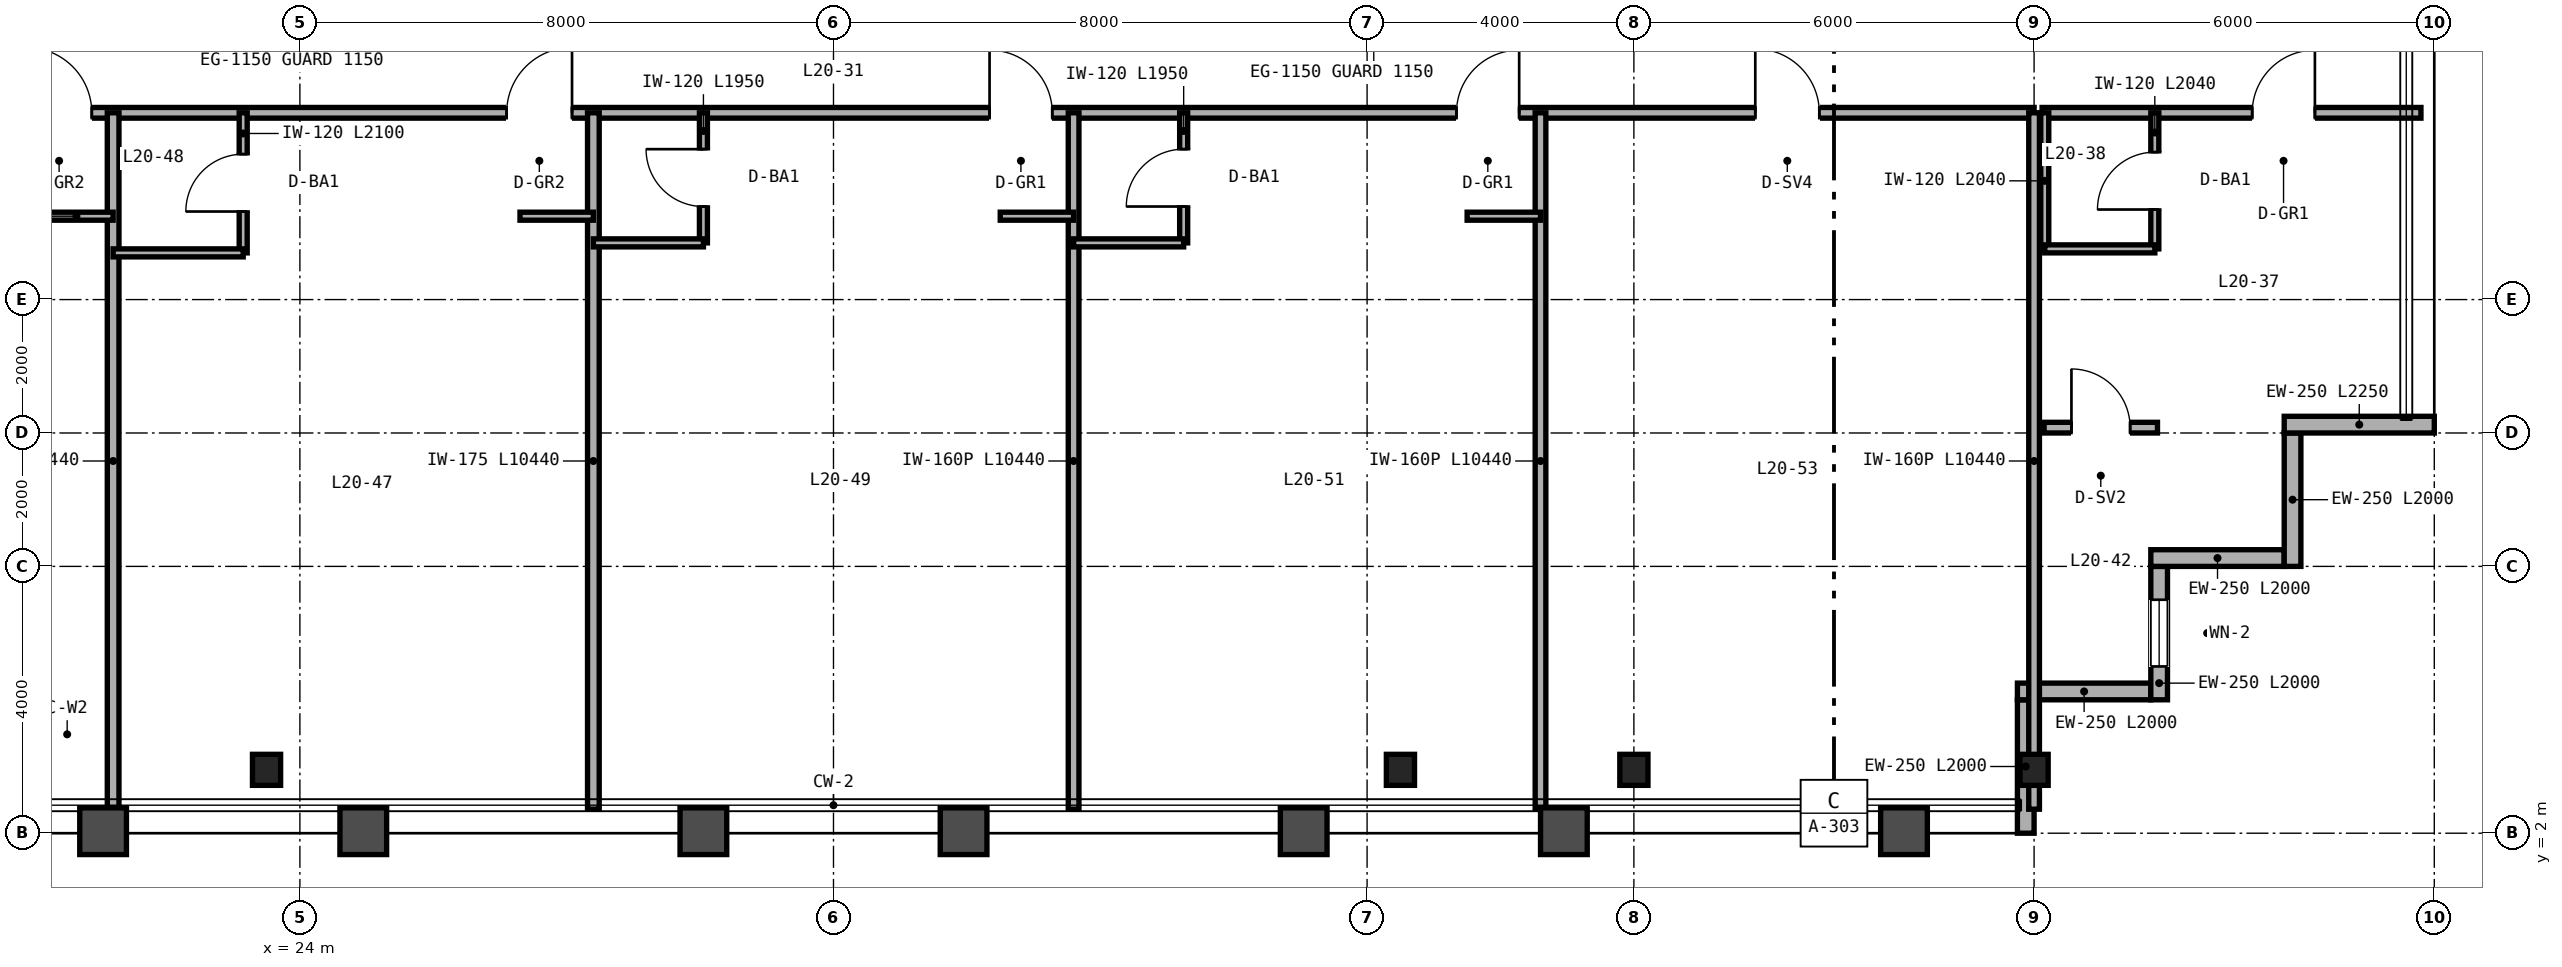
"""IFC4 building model, lengths in metres.
Left out: names, types, materials, properties, quantities, classifications, styles, units other than length and angle.
Written with IfcOpenShell. Run it as: python <this file> out.ifc"""

import sys

from ifc_helpers import new_model, si_unit, direction, frame, frame_2d, origin, origin_2d, place, context, subcontext, project, spatial, rectangle, i_section, extrude, source, transform, mapped, element, fill, save


model = new_model("IFC4")
c1 = context("Model", 3, precision=1e-05, world=origin(), true_north=direction((0.0, 1.0)))
c2 = subcontext(c1, "Body", "Model", "MODEL_VIEW")
j1 = project(units=[si_unit("LENGTHUNIT", "METRE"), si_unit("PLANEANGLEUNIT", "RADIAN")], contexts=[c1])
p1 = place(None, origin())
s1 = spatial("IfcSite", under=j1, at=p1, CompositionType="ELEMENT")
p2 = place(p1, origin())
s2 = spatial("IfcBuilding", under=s1, at=p2, CompositionType="ELEMENT")
p3 = place(p2, frame((0.0, 0.0, 81.6)))
s3 = spatial("IfcBuildingStorey", under=s2, at=p3, CompositionType="ELEMENT", Elevation=81.6)
m1 = source(origin(), c2, "Body", "SweptSolid", [
    extrude(i_section(OverallWidth=0.422, OverallDepth=0.465, WebThickness=0.045, FlangeThickness=0.073, FilletRadius=0.025, at=origin_2d()), origin(), (0.0, 0.0, 1.0), 3.28),
])
for number, where, z_axis, x_axis in (
    (1, (23.5, 2.95, 0.0), (0.0, 0.0, 1.0), (1.0, 0.0, 0.0)),
    (2, (40.5, 2.95, 0.0), (0.0, 0.0, 1.0), (1.0, 0.0, 0.0)),
    (3, (44.0, 2.95, 0.0), (0.0, 0.0, 1.0), (1.0, 0.0, 0.0)),
    (4, (50.0, 2.95, 0.0), (0.0, 0.0, 1.0), (1.0, 0.0, 0.0)),
):
    element("IfcColumn", number, at=place(p3, frame(where, z_axis=z_axis, x_axis=x_axis)), inside=s3, PredefinedType="COLUMN", context=c2, shape_type="MappedRepresentation", body=[
        mapped(m1, transform((0.0, 0.0, 0.0), scale=1.0)),
    ])
p4 = place(p3, frame((49.875, 2.0, 0.0), z_axis=(0.0, 0.0, 1.0), x_axis=(0.0, 1.0, 0.0)))
e5 = element("IfcWall", 5, at=p4, inside=s3, PredefinedType="SOLIDWALL", context=c2, shape_type="SweptSolid", body=[
    extrude(rectangle(XDim=2.0, YDim=0.25, at=frame_2d((1.0, 0.0))), origin(), (0.0, 0.0, 1.0), 2.587),
])
p5 = place(p3, frame((49.75, 4.125, 0.0), z_axis=(0.0, 0.0, 1.0), x_axis=(1.0, 0.0, 0.0)))
e6 = element("IfcWall", 6, at=p5, inside=s3, PredefinedType="SOLIDWALL", context=c2, shape_type="SweptSolid", body=[
    extrude(rectangle(XDim=2.0, YDim=0.25, at=frame_2d((1.0, 0.0))), origin(), (0.0, 0.0, 1.0), 3.28),
])
p6 = place(p3, frame((51.875, 4.0, 0.0), z_axis=(0.0, 0.0, 1.0), x_axis=(0.0, 1.0, 0.0)))
e7 = element("IfcWall", 7, at=p6, inside=s3, PredefinedType="SOLIDWALL", context=c2, shape_type="SweptSolid", body=[
    extrude(rectangle(XDim=2.0, YDim=0.25, at=frame_2d((1.0, 0.0))), origin(), (0.0, 0.0, 1.0), 3.28),
])
p7 = place(p6, frame((0.5, 0.0, 0.85)))
e8 = element("IfcOpeningElement", 8, at=p7, cuts=e7, PredefinedType="OPENING", context=c2, shape_type="SweptSolid", body=[
    extrude(rectangle(XDim=1.0, YDim=1.9, at=frame_2d((0.5, 0.95))), frame((0.0, 0.135, 0.0), z_axis=(0.0, -1.0, 0.0), x_axis=(1.0, 0.0, 0.0)), (0.0, 0.0, 1.0), 0.27),
])
for number, where, z_axis, x_axis in (
    (9, (51.75, 6.125, 0.0), (0.0, 0.0, 1.0), (1.0, 0.0, 0.0)),
    (10, (53.875, 6.0, 0.0), (0.0, 0.0, 1.0), (0.0, 1.0, 0.0)),
):
    element("IfcWall", number, at=place(p3, frame(where, z_axis=z_axis, x_axis=x_axis)), inside=s3, PredefinedType="SOLIDWALL", context=c2, shape_type="SweptSolid", body=[
        extrude(rectangle(XDim=2.0, YDim=0.25, at=frame_2d((1.0, 0.0))), origin(), (0.0, 0.0, 1.0), 3.28),
    ])
p8 = place(p3, frame((53.75, 8.125, 0.0), z_axis=(0.0, 0.0, 1.0), x_axis=(1.0, 0.0, 0.0)))
e11 = element("IfcWall", 11, at=p8, inside=s3, PredefinedType="SOLIDWALL", context=c2, shape_type="SweptSolid", body=[
    extrude(rectangle(XDim=2.25, YDim=0.25, at=frame_2d((1.125, 0.0))), origin(), (0.0, 0.0, 1.0), 3.28),
])
p9 = place(p3, frame((50.12, 12.8, 0.0), z_axis=(0.0, 0.0, 1.0), x_axis=(1.0, 0.0, 0.0)))
e12 = element("IfcWall", 12, at=p9, inside=s3, PredefinedType="PARTITIONING", context=c2, shape_type="SweptSolid", body=[
    extrude(rectangle(XDim=5.68, YDim=0.16, at=frame_2d((2.84, 0.0))), origin(), (0.0, 0.0, 1.0), 3.28),
])
p10 = place(p9, frame((3.15, 0.0, 0.0)))
e13 = element("IfcOpeningElement", 13, at=p10, cuts=e12, PredefinedType="OPENING", context=c2, shape_type="SweptSolid", body=[
    extrude(rectangle(XDim=0.94, YDim=2.15, at=frame_2d((0.47, 1.075))), frame((0.0, 0.09, 0.0), z_axis=(0.0, -1.0, 0.0), x_axis=(1.0, 0.0, 0.0)), (0.0, 0.0, 1.0), 0.18),
])
p11 = place(p3, frame((51.81, 10.76, 0.0), z_axis=(0.0, 0.0, 1.0), x_axis=(0.0, 1.0, 0.0)))
e14 = element("IfcWall", 14, at=p11, inside=s3, PredefinedType="PARTITIONING", context=c2, shape_type="SweptSolid", body=[
    extrude(rectangle(XDim=2.04, YDim=0.12, at=frame_2d((1.02, 0.0))), origin(), (0.0, 0.0, 1.0), 3.28),
])
p12 = place(p11, frame((0.59, 0.0, 0.0)))
e15 = element("IfcOpeningElement", 15, at=p12, cuts=e14, PredefinedType="OPENING", context=c2, shape_type="SweptSolid", body=[
    extrude(rectangle(XDim=0.86, YDim=2.1, at=frame_2d((0.43, 1.05))), frame((0.0, 0.07, 0.0), z_axis=(0.0, -1.0, 0.0), x_axis=(1.0, 0.0, 0.0)), (0.0, 0.0, 1.0), 0.14),
])
p13 = place(p3, frame((50.16, 10.76, 0.0), z_axis=(0.0, 0.0, 1.0), x_axis=(0.0, 1.0, 0.0)))
e16 = element("IfcWall", 16, at=p13, inside=s3, PredefinedType="PARTITIONING", context=c2, shape_type="SweptSolid", body=[
    extrude(rectangle(XDim=2.04, YDim=0.12, at=frame_2d((1.02, 0.0))), origin(), (0.0, 0.0, 1.0), 3.28),
])
p14 = place(p3, frame((50.16, 10.76, 0.0), z_axis=(0.0, 0.0, 1.0), x_axis=(1.0, 0.0, 0.0)))
e17 = element("IfcWall", 17, at=p14, inside=s3, PredefinedType="PARTITIONING", context=c2, shape_type="SweptSolid", body=[
    extrude(rectangle(XDim=1.65, YDim=0.12, at=frame_2d((0.825, 0.0))), origin(), (0.0, 0.0, 1.0), 3.28),
])
p15 = place(p3, frame((50.15, 8.08, 0.0), z_axis=(0.0, 0.0, 1.0), x_axis=(1.0, 0.0, 0.0)))
e18 = element("IfcWall", 18, at=p15, inside=s3, PredefinedType="PARTITIONING", context=c2, shape_type="SweptSolid", body=[
    extrude(rectangle(XDim=1.7, YDim=0.16, at=frame_2d((0.85, 0.0))), origin(), (0.0, 0.0, 1.0), 3.28),
])
p16 = place(p15, frame((0.41, 0.0, 0.0)))
e19 = element("IfcOpeningElement", 19, at=p16, cuts=e18, PredefinedType="OPENING", context=c2, shape_type="SweptSolid", body=[
    extrude(rectangle(XDim=0.88, YDim=2.15, at=frame_2d((0.44, 1.075))), frame((0.0, 0.09, 0.0), z_axis=(0.0, -1.0, 0.0), x_axis=(1.0, 0.0, 0.0)), (0.0, 0.0, 1.0), 0.18),
])
p17 = place(p3, frame((14.0, 12.8, 0.0), z_axis=(0.0, 0.0, 1.0), x_axis=(1.0, 0.0, 0.0)))
e20 = element("IfcWall", 20, at=p17, inside=s3, PredefinedType="PARTITIONING", context=c2, shape_type="SweptSolid", body=[
    extrude(rectangle(XDim=36.0, YDim=0.16, at=frame_2d((18.0, 0.0))), origin(), (0.0, 0.0, 1.0), 2.501),
])
p18 = place(p17, frame((5.9, 0.0, 0.0)))
e21 = element("IfcOpeningElement", 21, at=p18, cuts=e20, PredefinedType="OPENING", context=c2, shape_type="SweptSolid", body=[
    extrude(rectangle(XDim=0.98, YDim=2.2, at=frame_2d((0.49, 1.1))), frame((0.0, 0.09, 0.0), z_axis=(0.0, -1.0, 0.0), x_axis=(1.0, 0.0, 0.0)), (0.0, 0.0, 1.0), 0.18),
])
p19 = place(p17, frame((13.1, 0.0, 0.0)))
e22 = element("IfcOpeningElement", 22, at=p19, cuts=e20, PredefinedType="OPENING", context=c2, shape_type="SweptSolid", body=[
    extrude(rectangle(XDim=0.98, YDim=2.2, at=frame_2d((0.49, 1.1))), frame((0.0, 0.09, 0.0), z_axis=(0.0, -1.0, 0.0), x_axis=(1.0, 0.0, 0.0)), (0.0, 0.0, 1.0), 0.18),
])
p20 = place(p17, frame((20.34, 0.0, 0.0)))
e23 = element("IfcOpeningElement", 23, at=p20, cuts=e20, PredefinedType="OPENING", context=c2, shape_type="SweptSolid", body=[
    extrude(rectangle(XDim=0.94, YDim=2.15, at=frame_2d((0.47, 1.075))), frame((0.0, 0.09, 0.0), z_axis=(0.0, -1.0, 0.0), x_axis=(1.0, 0.0, 0.0)), (0.0, 0.0, 1.0), 0.18),
])
p21 = place(p17, frame((27.34, 0.0, 0.0)))
e24 = element("IfcOpeningElement", 24, at=p21, cuts=e20, PredefinedType="OPENING", context=c2, shape_type="SweptSolid", body=[
    extrude(rectangle(XDim=0.94, YDim=2.15, at=frame_2d((0.47, 1.075))), frame((0.0, 0.09, 0.0), z_axis=(0.0, -1.0, 0.0), x_axis=(1.0, 0.0, 0.0)), (0.0, 0.0, 1.0), 0.18),
])
p22 = place(p17, frame((31.82, 0.0, 0.0)))
e25 = element("IfcOpeningElement", 25, at=p22, cuts=e20, PredefinedType="OPENING", context=c2, shape_type="SweptSolid", body=[
    extrude(rectangle(XDim=0.96, YDim=2.15, at=frame_2d((0.48, 1.075))), frame((0.0, 0.09, 0.0), z_axis=(0.0, -1.0, 0.0), x_axis=(1.0, 0.0, 0.0)), (0.0, 0.0, 1.0), 0.18),
])
p23 = place(p3, frame((50.0, 2.36, 0.0), z_axis=(0.0, 0.0, 1.0), x_axis=(0.0, 1.0, 0.0)))
e26 = element("IfcWall", 26, at=p23, inside=s3, PredefinedType="PARTITIONING", context=c2, shape_type="SweptSolid", body=[
    extrude(rectangle(XDim=10.44, YDim=0.16, at=frame_2d((5.22, 0.0))), origin(), (0.0, 0.0, 1.0), 2.587),
])
p24 = place(p3, frame((21.2, 2.36, 0.0), z_axis=(0.0, 0.0, 1.0), x_axis=(0.0, 1.0, 0.0)))
e27 = element("IfcWall", 27, at=p24, inside=s3, PredefinedType="PARTITIONING", context=c2, shape_type="SweptSolid", body=[
    extrude(rectangle(XDim=10.44, YDim=0.175, at=frame_2d((5.22, 0.0))), origin(), (0.0, 0.0, 1.0), 2.743),
])
p25 = place(p3, frame((20.1, 11.25, 0.0), z_axis=(0.0, 0.0, 1.0), x_axis=(1.0, 0.0, 0.0)))
e28 = element("IfcWall", 28, at=p25, inside=s3, PredefinedType="PARTITIONING", context=c2, shape_type="SweptSolid", body=[
    extrude(rectangle(XDim=1.1, YDim=0.12, at=frame_2d((0.55, 0.0))), origin(), (0.0, 0.0, 1.0), 3.28),
])
p26 = place(p3, frame((28.4, 2.36, 0.0), z_axis=(0.0, 0.0, 1.0), x_axis=(0.0, 1.0, 0.0)))
e29 = element("IfcWall", 29, at=p26, inside=s3, PredefinedType="PARTITIONING", context=c2, shape_type="SweptSolid", body=[
    extrude(rectangle(XDim=10.44, YDim=0.175, at=frame_2d((5.22, 0.0))), origin(), (0.0, 0.0, 1.0), 2.36),
])
p27 = place(p3, frame((23.15, 10.7, 0.0), z_axis=(0.0, 0.0, 1.0), x_axis=(0.0, 1.0, 0.0)))
e30 = element("IfcWall", 30, at=p27, inside=s3, PredefinedType="PARTITIONING", context=c2, shape_type="SweptSolid", body=[
    extrude(rectangle(XDim=2.1, YDim=0.12, at=frame_2d((1.05, 0.0))), origin(), (0.0, 0.0, 1.0), 3.28),
])
p28 = place(p27, frame((0.62, 0.0, 0.0)))
e31 = element("IfcOpeningElement", 31, at=p28, cuts=e30, PredefinedType="OPENING", context=c2, shape_type="SweptSolid", body=[
    extrude(rectangle(XDim=0.86, YDim=2.1, at=frame_2d((0.43, 1.05))), frame((0.0, 0.07, 0.0), z_axis=(0.0, -1.0, 0.0), x_axis=(1.0, 0.0, 0.0)), (0.0, 0.0, 1.0), 0.14),
])
p29 = place(p3, frame((21.2, 10.7, 0.0), z_axis=(0.0, 0.0, 1.0), x_axis=(1.0, 0.0, 0.0)))
e32 = element("IfcWall", 32, at=p29, inside=s3, PredefinedType="PARTITIONING", context=c2, shape_type="SweptSolid", body=[
    extrude(rectangle(XDim=1.95, YDim=0.12, at=frame_2d((0.975, 0.0))), origin(), (0.0, 0.0, 1.0), 3.28),
])
p30 = place(p3, frame((27.3, 11.25, 0.0), z_axis=(0.0, 0.0, 1.0), x_axis=(1.0, 0.0, 0.0)))
e33 = element("IfcWall", 33, at=p30, inside=s3, PredefinedType="PARTITIONING", context=c2, shape_type="SweptSolid", body=[
    extrude(rectangle(XDim=1.1, YDim=0.12, at=frame_2d((0.55, 0.0))), origin(), (0.0, 0.0, 1.0), 3.28),
])
p31 = place(p3, frame((35.6, 2.36, 0.0), z_axis=(0.0, 0.0, 1.0), x_axis=(0.0, 1.0, 0.0)))
e34 = element("IfcWall", 34, at=p31, inside=s3, PredefinedType="PARTITIONING", context=c2, shape_type="SweptSolid", body=[
    extrude(rectangle(XDim=10.44, YDim=0.16, at=frame_2d((5.22, 0.0))), origin(), (0.0, 0.0, 1.0), 2.36),
])
p32 = place(p3, frame((30.05, 10.85, 0.0), z_axis=(0.0, 0.0, 1.0), x_axis=(0.0, 1.0, 0.0)))
e35 = element("IfcWall", 35, at=p32, inside=s3, PredefinedType="PARTITIONING", context=c2, shape_type="SweptSolid", body=[
    extrude(rectangle(XDim=1.95, YDim=0.12, at=frame_2d((0.975, 0.0))), origin(), (0.0, 0.0, 1.0), 3.28),
])
p33 = place(p32, frame((0.545, 0.0, 0.0)))
e36 = element("IfcOpeningElement", 36, at=p33, cuts=e35, PredefinedType="OPENING", context=c2, shape_type="SweptSolid", body=[
    extrude(rectangle(XDim=0.86, YDim=2.1, at=frame_2d((0.43, 1.05))), frame((0.0, 0.07, 0.0), z_axis=(0.0, -1.0, 0.0), x_axis=(1.0, 0.0, 0.0)), (0.0, 0.0, 1.0), 0.14),
])
p34 = place(p3, frame((28.4, 10.85, 0.0), z_axis=(0.0, 0.0, 1.0), x_axis=(1.0, 0.0, 0.0)))
e37 = element("IfcWall", 37, at=p34, inside=s3, PredefinedType="PARTITIONING", context=c2, shape_type="SweptSolid", body=[
    extrude(rectangle(XDim=1.65, YDim=0.12, at=frame_2d((0.825, 0.0))), origin(), (0.0, 0.0, 1.0), 3.28),
])
p35 = place(p3, frame((34.5, 11.25, 0.0), z_axis=(0.0, 0.0, 1.0), x_axis=(1.0, 0.0, 0.0)))
e38 = element("IfcWall", 38, at=p35, inside=s3, PredefinedType="PARTITIONING", context=c2, shape_type="SweptSolid", body=[
    extrude(rectangle(XDim=1.1, YDim=0.12, at=frame_2d((0.55, 0.0))), origin(), (0.0, 0.0, 1.0), 3.28),
])
p36 = place(p3, frame((42.6, 2.36, 0.0), z_axis=(0.0, 0.0, 1.0), x_axis=(0.0, 1.0, 0.0)))
e39 = element("IfcWall", 39, at=p36, inside=s3, PredefinedType="PARTITIONING", context=c2, shape_type="SweptSolid", body=[
    extrude(rectangle(XDim=10.44, YDim=0.16, at=frame_2d((5.22, 0.0))), origin(), (0.0, 0.0, 1.0), 2.743),
])
p37 = place(p3, frame((37.25, 10.85, 0.0), z_axis=(0.0, 0.0, 1.0), x_axis=(0.0, 1.0, 0.0)))
e40 = element("IfcWall", 40, at=p37, inside=s3, PredefinedType="PARTITIONING", context=c2, shape_type="SweptSolid", body=[
    extrude(rectangle(XDim=1.95, YDim=0.12, at=frame_2d((0.975, 0.0))), origin(), (0.0, 0.0, 1.0), 3.28),
])
p38 = place(p37, frame((0.545, 0.0, 0.0)))
e41 = element("IfcOpeningElement", 41, at=p38, cuts=e40, PredefinedType="OPENING", context=c2, shape_type="SweptSolid", body=[
    extrude(rectangle(XDim=0.86, YDim=2.1, at=frame_2d((0.43, 1.05))), frame((0.0, 0.07, 0.0), z_axis=(0.0, -1.0, 0.0), x_axis=(1.0, 0.0, 0.0)), (0.0, 0.0, 1.0), 0.14),
])
p39 = place(p3, frame((35.6, 10.85, 0.0), z_axis=(0.0, 0.0, 1.0), x_axis=(1.0, 0.0, 0.0)))
e42 = element("IfcWall", 42, at=p39, inside=s3, PredefinedType="PARTITIONING", context=c2, shape_type="SweptSolid", body=[
    extrude(rectangle(XDim=1.65, YDim=0.12, at=frame_2d((0.825, 0.0))), origin(), (0.0, 0.0, 1.0), 3.28),
])
p40 = place(p3, frame((41.5, 11.25, 0.0), z_axis=(0.0, 0.0, 1.0), x_axis=(1.0, 0.0, 0.0)))
e43 = element("IfcWall", 43, at=p40, inside=s3, PredefinedType="PARTITIONING", context=c2, shape_type="SweptSolid", body=[
    extrude(rectangle(XDim=1.1, YDim=0.12, at=frame_2d((0.55, 0.0))), origin(), (0.0, 0.0, 1.0), 3.28),
])
m2 = source(origin(), c2, "Body", "SweptSolid", [
    extrude(rectangle(XDim=1.0, YDim=1.9, at=frame_2d((0.5, 0.95))), frame((0.0, 0.03, 0.0), z_axis=(0.0, -1.0, 0.0), x_axis=(1.0, 0.0, 0.0)), (0.0, 0.0, 1.0), 0.06),
])
p41 = place(p7, origin())
e44 = element("IfcWindow", 44, at=p41, inside=s3, PartitioningType="SINGLE_PANEL", PredefinedType="WINDOW", context=c2, shape_type="MappedRepresentation", body=[
    mapped(m2, transform((0.0, 0.0, 0.0), scale=1.0)),
])
fill(e8, e44)
m3 = source(origin(), c2, "Body", "SweptSolid", [
    extrude(rectangle(XDim=0.86, YDim=2.1, at=frame_2d((0.43, 1.05))), frame((0.0, 0.025, 0.0), z_axis=(0.0, -1.0, 0.0), x_axis=(1.0, 0.0, 0.0)), (0.0, 0.0, 1.0), 0.05),
])
p42 = place(p12, origin())
e45 = element("IfcDoor", 45, at=p42, inside=s3, OperationType="SINGLE_SWING_LEFT", PredefinedType="DOOR", context=c2, shape_type="MappedRepresentation", body=[
    mapped(m3, transform((0.0, 0.0, 0.0), scale=1.0)),
])
fill(e15, e45)
m4 = source(origin(), c2, "Body", "SweptSolid", [
    extrude(rectangle(XDim=0.94, YDim=2.15, at=frame_2d((0.47, 1.075))), frame((0.0, 0.025, 0.0), z_axis=(0.0, -1.0, 0.0), x_axis=(1.0, 0.0, 0.0)), (0.0, 0.0, 1.0), 0.05),
])
p43 = place(p10, origin())
e46 = element("IfcDoor", 46, at=p43, inside=s3, OperationType="SINGLE_SWING_RIGHT", PredefinedType="DOOR", context=c2, shape_type="MappedRepresentation", body=[
    mapped(m4, transform((0.0, 0.0, 0.0), scale=1.0)),
])
fill(e13, e46)
m5 = source(origin(), c2, "Body", "SweptSolid", [
    extrude(rectangle(XDim=0.88, YDim=2.15, at=frame_2d((0.44, 1.075))), frame((0.0, 0.025, 0.0), z_axis=(0.0, -1.0, 0.0), x_axis=(1.0, 0.0, 0.0)), (0.0, 0.0, 1.0), 0.05),
])
p44 = place(p16, origin())
e47 = element("IfcDoor", 47, at=p44, inside=s3, OperationType="SINGLE_SWING_LEFT", PredefinedType="DOOR", context=c2, shape_type="MappedRepresentation", body=[
    mapped(m5, transform((0.0, 0.0, 0.0), scale=1.0)),
])
fill(e19, e47)
p45 = place(p28, origin())
e48 = element("IfcDoor", 48, at=p45, inside=s3, OperationType="SINGLE_SWING_LEFT", PredefinedType="DOOR", context=c2, shape_type="MappedRepresentation", body=[
    mapped(m3, transform((0.0, 0.0, 0.0), scale=1.0)),
])
fill(e31, e48)
p46 = place(p33, origin())
e49 = element("IfcDoor", 49, at=p46, inside=s3, OperationType="SINGLE_SWING_RIGHT", PredefinedType="DOOR", context=c2, shape_type="MappedRepresentation", body=[
    mapped(m3, transform((0.0, 0.0, 0.0), scale=1.0)),
])
fill(e36, e49)
p47 = place(p38, origin())
e50 = element("IfcDoor", 50, at=p47, inside=s3, OperationType="SINGLE_SWING_LEFT", PredefinedType="DOOR", context=c2, shape_type="MappedRepresentation", body=[
    mapped(m3, transform((0.0, 0.0, 0.0), scale=1.0)),
])
fill(e41, e50)
m6 = source(origin(), c2, "Body", "SweptSolid", [
    extrude(rectangle(XDim=0.98, YDim=2.2, at=frame_2d((0.49, 1.1))), frame((0.0, 0.025, 0.0), z_axis=(0.0, -1.0, 0.0), x_axis=(1.0, 0.0, 0.0)), (0.0, 0.0, 1.0), 0.05),
])
p48 = place(p18, origin())
e51 = element("IfcDoor", 51, at=p48, inside=s3, OperationType="SINGLE_SWING_LEFT", PredefinedType="DOOR", context=c2, shape_type="MappedRepresentation", body=[
    mapped(m6, transform((0.0, 0.0, 0.0), scale=1.0)),
])
fill(e21, e51)
p49 = place(p19, origin())
e52 = element("IfcDoor", 52, at=p49, inside=s3, OperationType="SINGLE_SWING_RIGHT", PredefinedType="DOOR", context=c2, shape_type="MappedRepresentation", body=[
    mapped(m6, transform((0.0, 0.0, 0.0), scale=1.0)),
])
fill(e22, e52)
p50 = place(p20, origin())
e53 = element("IfcDoor", 53, at=p50, inside=s3, OperationType="SINGLE_SWING_LEFT", PredefinedType="DOOR", context=c2, shape_type="MappedRepresentation", body=[
    mapped(m4, transform((0.0, 0.0, 0.0), scale=1.0)),
])
fill(e23, e53)
p51 = place(p21, origin())
e54 = element("IfcDoor", 54, at=p51, inside=s3, OperationType="SINGLE_SWING_RIGHT", PredefinedType="DOOR", context=c2, shape_type="MappedRepresentation", body=[
    mapped(m4, transform((0.0, 0.0, 0.0), scale=1.0)),
])
fill(e24, e54)
m7 = source(origin(), c2, "Body", "SweptSolid", [
    extrude(rectangle(XDim=0.96, YDim=2.15, at=frame_2d((0.48, 1.075))), frame((0.0, 0.025, 0.0), z_axis=(0.0, -1.0, 0.0), x_axis=(1.0, 0.0, 0.0)), (0.0, 0.0, 1.0), 0.05),
])
p52 = place(p22, origin())
e55 = element("IfcDoor", 55, at=p52, inside=s3, OperationType="SINGLE_SWING_LEFT", PredefinedType="DOOR", context=c2, shape_type="MappedRepresentation", body=[
    mapped(m7, transform((0.0, 0.0, 0.0), scale=1.0)),
])
fill(e25, e55)
save(model, sys.argv[1])
